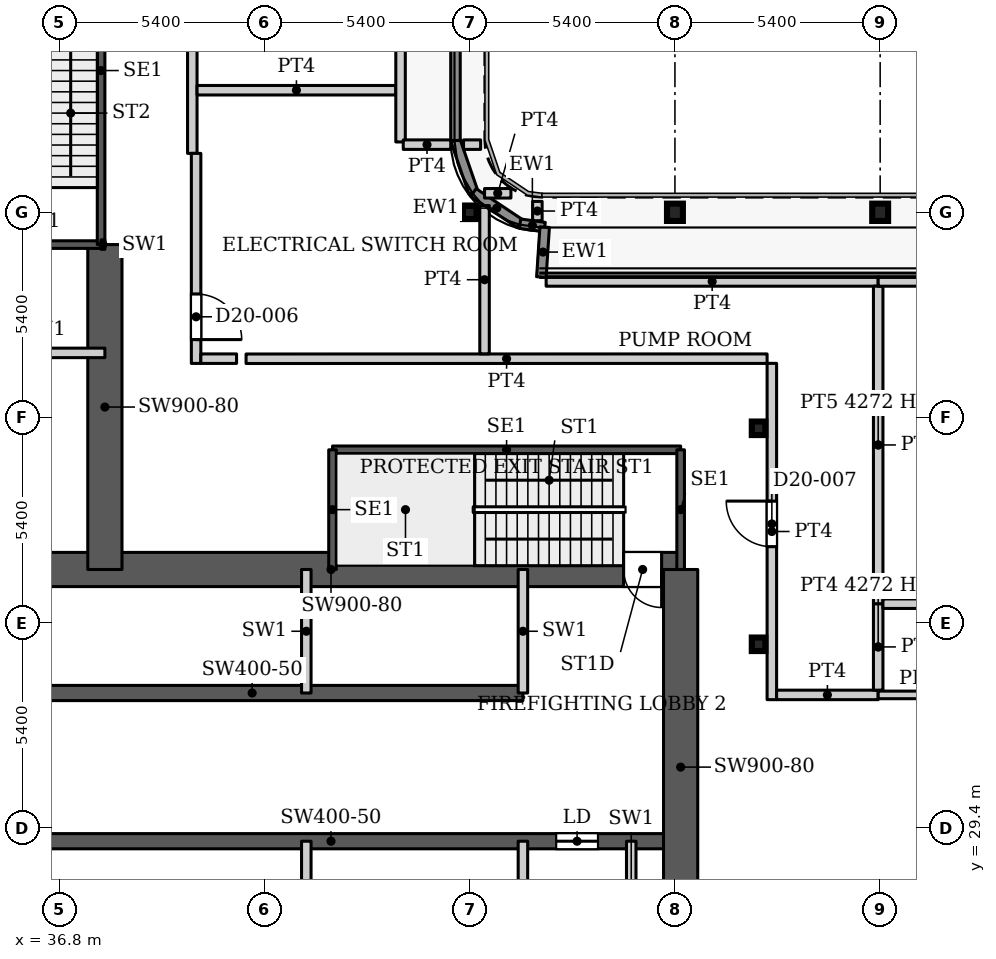
"""IFC4 building model, lengths in metres.
Left out: names, types, materials, properties, quantities, classifications, styles, units other than length and angle.
Written with IfcOpenShell. Run it as: python <this file> out.ifc"""

import sys

from ifc_helpers import new_model, si_unit, direction, frame, frame_2d, origin, origin_2d, place, context, subcontext, project, spatial, rectangle, hollow_rectangle, i_section, extrude, source, transform, mapped, element, fill, save


model = new_model("IFC4")
c1 = context("Model", 3, precision=1e-05, world=origin(), true_north=direction((0.0, 1.0)))
c2 = subcontext(c1, "Body", "Model", "MODEL_VIEW")
j1 = project(units=[si_unit("LENGTHUNIT", "METRE"), si_unit("PLANEANGLEUNIT", "RADIAN")], contexts=[c1])
p1 = place(None, origin())
s1 = spatial("IfcSite", under=j1, at=p1, CompositionType="ELEMENT")
p2 = place(p1, origin())
s2 = spatial("IfcBuilding", under=s1, at=p2, CompositionType="ELEMENT")
p3 = place(p2, frame((0.0, 0.0, 89.0)))
s3 = spatial("IfcBuildingStorey", under=s2, at=p3, CompositionType="ELEMENT", Elevation=89.0)
for number, where, z_axis, x_axis in (
    (1, (53.0, 45.6, 0.0), (0.0, 0.0, 1.0), (1.0, 0.0, 0.0)),
    (2, (58.4, 45.6, 0.0), (0.0, 0.0, 1.0), (1.0, 0.0, 0.0)),
):
    element("IfcColumn", number, at=place(p3, frame(where, z_axis=z_axis, x_axis=x_axis)), inside=s3, PredefinedType="COLUMN", context=c2, shape_type="SweptSolid", body=[
        extrude(i_section(OverallWidth=0.418, OverallDepth=0.455, WebThickness=0.042, FlangeThickness=0.068, FilletRadius=0.014, at=origin_2d()), origin(), (0.0, 0.0, 1.0), 5.1),
    ])
for number, where, z_axis, x_axis in (
    (3, (55.2, 34.232, 0.0), (0.0, 0.0, 1.0), (1.0, 0.0, 0.0)),
    (4, (55.2, 39.916, 0.0), (0.0, 0.0, 1.0), (1.0, 0.0, 0.0)),
    (5, (47.6, 45.6, 0.0), (0.0, 0.0, 1.0), (1.0, 0.0, 0.0)),
):
    element("IfcColumn", number, at=place(p3, frame(where, z_axis=z_axis, x_axis=x_axis)), inside=s3, PredefinedType="COLUMN", context=c2, shape_type="SweptSolid", body=[
        extrude(hollow_rectangle(XDim=0.356, YDim=0.356, WallThickness=0.016, InnerFilletRadius=0.016, OuterFilletRadius=0.032, at=origin_2d()), origin(), (0.0, 0.0, 1.0), 5.1),
    ])
p4 = place(p3, frame((34.75, 29.05, 0.0), z_axis=(0.0, 0.0, 1.0), x_axis=(1.0, 0.0, 0.0)))
e6 = element("IfcWall", 6, at=p4, inside=s3, PredefinedType="SHEAR", context=c2, shape_type="SweptSolid", body=[
    extrude(rectangle(XDim=18.4, YDim=0.4, at=frame_2d((9.2, 0.0))), origin(), (0.0, 0.0, 1.0), 5.1),
])
p5 = place(p4, frame((15.125, 0.0, 0.0)))
e7 = element("IfcOpeningElement", 7, at=p5, cuts=e6, PredefinedType="OPENING", context=c2, shape_type="SweptSolid", body=[
    extrude(rectangle(XDim=1.1, YDim=2.2, at=frame_2d((0.55, 1.1))), frame((0.0, 0.21, 0.0), z_axis=(0.0, -1.0, 0.0), x_axis=(1.0, 0.0, 0.0)), (0.0, 0.0, 1.0), 0.42),
])
p6 = place(p3, frame((34.75, 32.95, 0.0), z_axis=(0.0, 0.0, 1.0), x_axis=(1.0, 0.0, 0.0)))
e8 = element("IfcWall", 8, at=p6, inside=s3, PredefinedType="SHEAR", context=c2, shape_type="SweptSolid", body=[
    extrude(rectangle(XDim=14.25, YDim=0.4, at=frame_2d((7.125, 0.0))), origin(), (0.0, 0.0, 1.0), 5.1),
])
p7 = place(p3, frame((34.75, 36.2, 0.0), z_axis=(0.0, 0.0, 1.0), x_axis=(1.0, 0.0, 0.0)))
e9 = element("IfcWall", 9, at=p7, inside=s3, PredefinedType="SHEAR", context=c2, shape_type="SweptSolid", body=[
    extrude(rectangle(XDim=18.4, YDim=0.9, at=frame_2d((9.2, 0.0))), origin(), (0.0, 0.0, 1.0), 5.1),
])
p8 = place(p7, frame((16.9, 0.0, 0.0)))
e10 = element("IfcOpeningElement", 10, at=p8, cuts=e9, PredefinedType="OPENING", context=c2, shape_type="SweptSolid", body=[
    extrude(rectangle(XDim=1.0, YDim=2.2, at=frame_2d((0.5, 1.1))), frame((0.0, 0.46, 0.0), z_axis=(0.0, -1.0, 0.0), x_axis=(1.0, 0.0, 0.0)), (0.0, 0.0, 1.0), 0.92),
])
p9 = place(p3, frame((38.0, 36.2, 0.0), z_axis=(0.0, 0.0, 1.0), x_axis=(0.0, 1.0, 0.0)))
e11 = element("IfcWall", 11, at=p9, inside=s3, PredefinedType="SHEAR", context=c2, shape_type="SweptSolid", body=[
    extrude(rectangle(XDim=8.55, YDim=0.9, at=frame_2d((4.275, 0.0))), origin(), (0.0, 0.0, 1.0), 5.1),
])
p10 = place(p3, frame((53.15, 25.8, 0.0), z_axis=(0.0, 0.0, 1.0), x_axis=(0.0, 1.0, 0.0)))
e12 = element("IfcWall", 12, at=p10, inside=s3, PredefinedType="SHEAR", context=c2, shape_type="SweptSolid", body=[
    extrude(rectangle(XDim=10.4, YDim=0.9, at=frame_2d((5.2, 0.0))), origin(), (0.0, 0.0, 1.0), 5.1),
])
p11 = place(p3, frame((47.225, 47.49, 0.0), z_axis=(0.0, 0.0, 1.0), x_axis=(0.326317748334, -0.945260137276, 0.0)))
e13 = element("IfcWall", 13, at=p11, inside=s3, PredefinedType="SOLIDWALL", context=c2, shape_type="SweptSolid", body=[
    extrude(rectangle(XDim=1.449, YDim=0.25, at=frame_2d((0.725, 0.0))), origin(), (0.0, 0.0, 1.0), 4.95),
])
p12 = place(p3, frame((47.698, 46.12, 0.0), z_axis=(0.0, 0.0, 1.0), x_axis=(0.831413506611, -0.555654191943, 0.0)))
e14 = element("IfcWall", 14, at=p12, inside=s3, PredefinedType="SOLIDWALL", context=c2, shape_type="SweptSolid", body=[
    extrude(rectangle(XDim=1.476, YDim=0.25, at=frame_2d((0.738, 0.0))), origin(), (0.0, 0.0, 1.0), 4.95),
])
p13 = place(p3, frame((48.925, 45.3, 0.0), z_axis=(0.0, 0.0, 1.0), x_axis=(0.990444114284, -0.137914671008, 0.0)))
e15 = element("IfcWall", 15, at=p13, inside=s3, PredefinedType="SOLIDWALL", context=c2, shape_type="SweptSolid", body=[
    extrude(rectangle(XDim=0.653, YDim=0.25, at=frame_2d((0.327, 0.0))), origin(), (0.0, 0.0, 1.0), 4.95),
])
p14 = place(p3, frame((49.572, 45.21, 0.0), z_axis=(0.0, 0.0, 1.0), x_axis=(-0.065312093682, -0.997864885853, 0.0)))
e16 = element("IfcWall", 16, at=p14, inside=s3, PredefinedType="SOLIDWALL", context=c2, shape_type="SweptSolid", body=[
    extrude(rectangle(XDim=1.316, YDim=0.25, at=frame_2d((0.658, 0.0))), origin(), (0.0, 0.0, 1.0), 4.95),
])
p15 = place(p3, frame((47.225, 98.66, 0.0), z_axis=(0.0, 0.0, 1.0), x_axis=(0.0, -1.0, 0.0)))
e17 = element("IfcWall", 17, at=p15, inside=s3, PredefinedType="SOLIDWALL", context=c2, shape_type="SweptSolid", body=[
    extrude(rectangle(XDim=51.17, YDim=0.25, at=frame_2d((25.585, 0.0))), origin(), (0.0, 0.0, 1.0), 4.95),
])
p16 = place(p3, frame((43.99, 39.35, 0.0), z_axis=(0.0, 0.0, 1.0), x_axis=(1.0, 0.0, 0.0)))
e18 = element("IfcWall", 18, at=p16, inside=s3, PredefinedType="SHEAR", context=c2, shape_type="SweptSolid", body=[
    extrude(rectangle(XDim=9.16, YDim=0.2, at=frame_2d((4.58, 0.0))), origin(), (0.0, 0.0, 1.0), 5.1),
])
for number, where, z_axis, x_axis in (
    (19, (43.99, 36.2, 0.0), (0.0, 0.0, 1.0), (0.0, 1.0, 0.0)),
    (20, (53.15, 36.2, 0.0), (0.0, 0.0, 1.0), (0.0, 1.0, 0.0)),
):
    element("IfcWall", number, at=place(p3, frame(where, z_axis=z_axis, x_axis=x_axis)), inside=s3, PredefinedType="SHEAR", context=c2, shape_type="SweptSolid", body=[
        extrude(rectangle(XDim=3.15, YDim=0.2, at=frame_2d((1.575, 0.0))), origin(), (0.0, 0.0, 1.0), 5.1),
    ])
p17 = place(p3, frame((34.75, 44.75, 0.0), z_axis=(0.0, 0.0, 1.0), x_axis=(1.0, 0.0, 0.0)))
e21 = element("IfcWall", 21, at=p17, inside=s3, PredefinedType="SHEAR", context=c2, shape_type="SweptSolid", body=[
    extrude(rectangle(XDim=3.15, YDim=0.2, at=frame_2d((1.575, 0.0))), origin(), (0.0, 0.0, 1.0), 5.1),
])
p18 = place(p3, frame((37.9, 44.75, 0.0), z_axis=(0.0, 0.0, 1.0), x_axis=(0.0, 1.0, 0.0)))
e22 = element("IfcWall", 22, at=p18, inside=s3, PredefinedType="SHEAR", context=c2, shape_type="SweptSolid", body=[
    extrude(rectangle(XDim=9.16, YDim=0.2, at=frame_2d((4.58, 0.0))), origin(), (0.0, 0.0, 1.0), 5.1),
])
for number, where, z_axis, x_axis in (
    (23, (43.3, 25.8, 0.0), (0.0, 0.0, 1.0), (0.0, 1.0, 0.0)),
    (24, (43.3, 32.95, 0.0), (0.0, 0.0, 1.0), (0.0, 1.0, 0.0)),
    (25, (49.0, 25.8, 0.0), (0.0, 0.0, 1.0), (0.0, 1.0, 0.0)),
    (26, (49.0, 32.95, 0.0), (0.0, 0.0, 1.0), (0.0, 1.0, 0.0)),
    (27, (51.85, 25.8, 0.0), (0.0, 0.0, 1.0), (0.0, 1.0, 0.0)),
    (28, (34.75, 41.9, 0.0), (0.0, 0.0, 1.0), (1.0, 0.0, 0.0)),
):
    element("IfcWall", number, at=place(p3, frame(where, z_axis=z_axis, x_axis=x_axis)), inside=s3, PredefinedType="PARTITIONING", context=c2, shape_type="SweptSolid", body=[
        extrude(rectangle(XDim=3.25, YDim=0.25, at=frame_2d((1.625, 0.0))), origin(), (0.0, 0.0, 1.0), 5.1),
    ])
p19 = place(p3, frame((37.9, 44.75, 0.0), z_axis=(0.0, 0.0, 1.0), x_axis=(1.0, 0.0, 0.0)))
e29 = element("IfcWall", 29, at=p19, inside=s3, PredefinedType="PARTITIONING", context=c2, shape_type="SweptSolid", body=[
    extrude(rectangle(XDim=0.1, YDim=0.25, at=frame_2d((0.05, 0.0))), origin(), (0.0, 0.0, 1.0), 5.1),
])
p20 = place(p3, frame((40.3, 47.15, 0.0), z_axis=(0.0, 0.0, 1.0), x_axis=(0.0, 1.0, 0.0)))
e30 = element("IfcWall", 30, at=p20, inside=s3, PredefinedType="PARTITIONING", context=c2, shape_type="SweptSolid", body=[
    extrude(rectangle(XDim=9.285, YDim=0.25, at=frame_2d((4.643, 0.0))), origin(), (0.0, 0.0, 1.0), 4.8),
])
p21 = place(p20, frame((4.812, 0.0, 0.0)))
e31 = element("IfcOpeningElement", 31, at=p21, cuts=e30, PredefinedType="OPENING", context=c2, shape_type="SweptSolid", body=[
    extrude(rectangle(XDim=1.2, YDim=2.1, at=frame_2d((0.6, 1.05))), frame((0.0, 0.135, 0.0), z_axis=(0.0, -1.0, 0.0), x_axis=(1.0, 0.0, 0.0)), (0.0, 0.0, 1.0), 0.27),
])
p22 = place(p3, frame((40.4, 41.623, 0.0), z_axis=(0.0, 0.0, 1.0), x_axis=(0.0, 1.0, 0.0)))
e32 = element("IfcWall", 32, at=p22, inside=s3, PredefinedType="PARTITIONING", context=c2, shape_type="SweptSolid", body=[
    extrude(rectangle(XDim=5.527, YDim=0.25, at=frame_2d((2.763, 0.0))), origin(), (0.0, 0.0, 1.0), 4.8),
])
p23 = place(p22, frame((0.627, 0.0, 0.0)))
e33 = element("IfcOpeningElement", 33, at=p23, cuts=e32, PredefinedType="OPENING", context=c2, shape_type="SweptSolid", body=[
    extrude(rectangle(XDim=1.2, YDim=2.1, at=frame_2d((0.6, 1.05))), frame((0.0, 0.135, 0.0), z_axis=(0.0, -1.0, 0.0), x_axis=(1.0, 0.0, 0.0)), (0.0, 0.0, 1.0), 0.27),
])
p24 = place(p3, frame((40.425, 48.812, 0.0), z_axis=(0.0, 0.0, 1.0), x_axis=(1.0, 0.0, 0.0)))
e34 = element("IfcWall", 34, at=p24, inside=s3, PredefinedType="PARTITIONING", context=c2, shape_type="SweptSolid", body=[
    extrude(rectangle(XDim=5.23, YDim=0.25, at=frame_2d((2.615, 0.0))), origin(), (0.0, 0.0, 1.0), 4.8),
])
p25 = place(p3, frame((40.525, 41.748, 0.0), z_axis=(0.0, 0.0, 1.0), x_axis=(1.0, 0.0, 0.0)))
e35 = element("IfcWall", 35, at=p25, inside=s3, PredefinedType="PARTITIONING", context=c2, shape_type="SweptSolid", body=[
    extrude(rectangle(XDim=0.94, YDim=0.25, at=frame_2d((0.47, 0.0))), origin(), (0.0, 0.0, 1.0), 4.8),
])
p26 = place(p3, frame((41.715, 41.746, 0.0), z_axis=(0.0, 0.0, 1.0), x_axis=(0.999999989853, 0.000142460288, 0.0)))
e36 = element("IfcWall", 36, at=p26, inside=s3, PredefinedType="PARTITIONING", context=c2, shape_type="SweptSolid", body=[
    extrude(rectangle(XDim=13.71, YDim=0.25, at=frame_2d((6.855, 0.0))), origin(), (0.0, 0.0, 1.0), 4.8),
])
p27 = place(p3, frame((45.78, 47.451, 0.0), z_axis=(0.0, 0.0, 1.0), x_axis=(0.0, 1.0, 0.0)))
e37 = element("IfcWall", 37, at=p27, inside=s3, PredefinedType="PARTITIONING", context=c2, shape_type="SweptSolid", body=[
    extrude(rectangle(XDim=11.573, YDim=0.25, at=frame_2d((5.787, 0.0))), origin(), (0.0, 0.0, 1.0), 4.8),
])
p28 = place(p3, frame((45.851, 47.38, 0.0), z_axis=(0.0, 0.0, 1.0), x_axis=(1.0, 0.0, 0.0)))
e38 = element("IfcWall", 38, at=p28, inside=s3, PredefinedType="PARTITIONING", context=c2, shape_type="SweptSolid", body=[
    extrude(rectangle(XDim=1.25, YDim=0.25, at=frame_2d((0.625, 0.0))), origin(), (0.0, 0.0, 1.0), 4.8),
])
p29 = place(p3, frame((47.437, 47.38, 0.0), z_axis=(0.0, 0.0, 1.0), x_axis=(1.0, 0.0, 0.0)))
e39 = element("IfcWall", 39, at=p29, inside=s3, PredefinedType="PARTITIONING", context=c2, shape_type="SweptSolid", body=[
    extrude(rectangle(XDim=0.45, YDim=0.25, at=frame_2d((0.225, 0.0))), origin(), (0.0, 0.0, 1.0), 4.8),
])
p30 = place(p3, frame((47.99, 41.875, 0.0), z_axis=(0.0, 0.0, 1.0), x_axis=(0.0, 1.0, 0.0)))
e40 = element("IfcWall", 40, at=p30, inside=s3, PredefinedType="PARTITIONING", context=c2, shape_type="SweptSolid", body=[
    extrude(rectangle(XDim=3.901, YDim=0.25, at=frame_2d((1.95, 0.0))), origin(), (0.0, 0.0, 1.0), 4.8),
])
p31 = place(p3, frame((47.99, 46.1, 0.0), z_axis=(0.0, 0.0, 1.0), x_axis=(1.0, 0.0, 0.0)))
e41 = element("IfcWall", 41, at=p31, inside=s3, PredefinedType="PARTITIONING", context=c2, shape_type="SweptSolid", body=[
    extrude(rectangle(XDim=0.694, YDim=0.25, at=frame_2d((0.347, 0.0))), origin(), (0.0, 0.0, 1.0), 4.8),
])
p32 = place(p3, frame((49.38, 45.379, 0.0), z_axis=(0.0, 0.0, 1.0), x_axis=(0.0, 1.0, 0.0)))
e42 = element("IfcWall", 42, at=p32, inside=s3, PredefinedType="PARTITIONING", context=c2, shape_type="SweptSolid", body=[
    extrude(rectangle(XDim=0.508, YDim=0.25, at=frame_2d((0.254, 0.0))), origin(), (0.0, 0.0, 1.0), 4.8),
])
p33 = place(p3, frame((49.611, 43.78, 0.0), z_axis=(0.0, 0.0, 1.0), x_axis=(1.0, 0.0, 0.0)))
e43 = element("IfcWall", 43, at=p33, inside=s3, PredefinedType="PARTITIONING", context=c2, shape_type="SweptSolid", body=[
    extrude(rectangle(XDim=8.737, YDim=0.25, at=frame_2d((4.368, 0.0))), origin(), (0.0, 0.0, 1.0), 4.8),
])
p34 = place(p3, frame((55.55, 32.775, 0.0), z_axis=(0.0, 0.0, 1.0), x_axis=(0.0, 1.0, 0.0)))
e44 = element("IfcWall", 44, at=p34, inside=s3, PredefinedType="PARTITIONING", context=c2, shape_type="SweptSolid", body=[
    extrude(rectangle(XDim=8.85, YDim=0.25, at=frame_2d((4.425, 0.0))), origin(), (0.0, 0.0, 1.0), 4.8),
])
p35 = place(p34, frame((4.025, 0.0, 0.0)))
e45 = element("IfcOpeningElement", 45, at=p35, cuts=e44, PredefinedType="OPENING", context=c2, shape_type="SweptSolid", body=[
    extrude(rectangle(XDim=1.2, YDim=2.1, at=frame_2d((0.6, 1.05))), frame((0.0, 0.135, 0.0), z_axis=(0.0, -1.0, 0.0), x_axis=(1.0, 0.0, 0.0)), (0.0, 0.0, 1.0), 0.27),
])
p36 = place(p3, frame((55.675, 32.9, 0.0), z_axis=(0.0, 0.0, 1.0), x_axis=(1.0, 0.0, 0.0)))
e46 = element("IfcWall", 46, at=p36, inside=s3, PredefinedType="PARTITIONING", context=c2, shape_type="SweptSolid", body=[
    extrude(rectangle(XDim=2.673, YDim=0.25, at=frame_2d((1.336, 0.0))), origin(), (0.0, 0.0, 1.0), 4.8),
])
p37 = place(p3, frame((58.348, 32.9, 0.0), z_axis=(0.0, 0.0, 1.0), x_axis=(1.0, 0.0, 0.0)))
e47 = element("IfcWall", 47, at=p37, inside=s3, PredefinedType="PARTITIONING", context=c2, shape_type="SweptSolid", body=[
    extrude(rectangle(XDim=41.532, YDim=0.2, at=frame_2d((20.766, 0.0))), origin(), (0.0, 0.0, 1.0), 4.8),
])
p38 = place(p37, frame((4.158, 0.0, 0.0)))
e48 = element("IfcOpeningElement", 48, at=p38, cuts=e47, PredefinedType="OPENING", context=c2, shape_type="SweptSolid", body=[
    extrude(rectangle(XDim=1.8, YDim=2.1, at=frame_2d((0.9, 1.05))), frame((0.0, 0.11, 0.0), z_axis=(0.0, -1.0, 0.0), x_axis=(1.0, 0.0, 0.0)), (0.0, 0.0, 1.0), 0.22),
])
p39 = place(p37, frame((14.516, 0.0, 0.0)))
e49 = element("IfcOpeningElement", 49, at=p39, cuts=e47, PredefinedType="OPENING", context=c2, shape_type="SweptSolid", body=[
    extrude(rectangle(XDim=1.8, YDim=2.1, at=frame_2d((0.9, 1.05))), frame((0.0, 0.11, 0.0), z_axis=(0.0, -1.0, 0.0), x_axis=(1.0, 0.0, 0.0)), (0.0, 0.0, 1.0), 0.22),
])
p40 = place(p37, frame((24.874, 0.0, 0.0)))
e50 = element("IfcOpeningElement", 50, at=p40, cuts=e47, PredefinedType="OPENING", context=c2, shape_type="SweptSolid", body=[
    extrude(rectangle(XDim=1.8, YDim=2.1, at=frame_2d((0.9, 1.05))), frame((0.0, 0.11, 0.0), z_axis=(0.0, -1.0, 0.0), x_axis=(1.0, 0.0, 0.0)), (0.0, 0.0, 1.0), 0.22),
])
p41 = place(p37, frame((35.232, 0.0, 0.0)))
e51 = element("IfcOpeningElement", 51, at=p41, cuts=e47, PredefinedType="OPENING", context=c2, shape_type="SweptSolid", body=[
    extrude(rectangle(XDim=1.8, YDim=2.1, at=frame_2d((0.9, 1.05))), frame((0.0, 0.11, 0.0), z_axis=(0.0, -1.0, 0.0), x_axis=(1.0, 0.0, 0.0)), (0.0, 0.0, 1.0), 0.22),
])
p42 = place(p3, frame((58.348, 33.025, 0.0), z_axis=(0.0, 0.0, 1.0), x_axis=(0.0, 1.0, 0.0)))
e52 = element("IfcWall", 52, at=p42, inside=s3, PredefinedType="PARTITIONING", context=c2, shape_type="SweptSolid", body=[
    extrude(rectangle(XDim=2.275, YDim=0.25, at=frame_2d((1.138, 0.0))), origin(), (0.0, 0.0, 1.0), 4.272),
])
p43 = place(p3, frame((58.348, 35.3, 0.0), z_axis=(0.0, 0.0, 1.0), x_axis=(0.0, 1.0, 0.0)))
e53 = element("IfcWall", 53, at=p43, inside=s3, PredefinedType="PARTITIONING", context=c2, shape_type="SweptSolid", body=[
    extrude(rectangle(XDim=8.355, YDim=0.25, at=frame_2d((4.177, 0.0))), origin(), (0.0, 0.0, 1.0), 4.272),
])
p44 = place(p3, frame((58.348, 43.78, 0.0), z_axis=(0.0, 0.0, 1.0), x_axis=(1.0, 0.0, 0.0)))
e54 = element("IfcWall", 54, at=p44, inside=s3, PredefinedType="PARTITIONING", context=c2, shape_type="SweptSolid", body=[
    extrude(rectangle(XDim=14.783, YDim=0.25, at=frame_2d((7.392, 0.0))), origin(), (0.0, 0.0, 1.0), 4.8),
])
p45 = place(p3, frame((58.473, 35.3, 0.0), z_axis=(0.0, 0.0, 1.0), x_axis=(1.0, 0.0, 0.0)))
e55 = element("IfcWall", 55, at=p45, inside=s3, PredefinedType="PARTITIONING", context=c2, shape_type="SweptSolid", body=[
    extrude(rectangle(XDim=41.182, YDim=0.25, at=frame_2d((20.591, 0.0))), origin(), (0.0, 0.0, 1.0), 4.8),
])
p46 = place(p45, frame((4.033, 0.0, 0.0)))
e56 = element("IfcOpeningElement", 56, at=p46, cuts=e55, PredefinedType="OPENING", context=c2, shape_type="SweptSolid", body=[
    extrude(rectangle(XDim=1.8, YDim=2.1, at=frame_2d((0.9, 1.05))), frame((0.0, 0.135, 0.0), z_axis=(0.0, -1.0, 0.0), x_axis=(1.0, 0.0, 0.0)), (0.0, 0.0, 1.0), 0.27),
])
p47 = place(p45, frame((14.391, 0.0, 0.0)))
e57 = element("IfcOpeningElement", 57, at=p47, cuts=e55, PredefinedType="OPENING", context=c2, shape_type="SweptSolid", body=[
    extrude(rectangle(XDim=1.8, YDim=2.1, at=frame_2d((0.9, 1.05))), frame((0.0, 0.135, 0.0), z_axis=(0.0, -1.0, 0.0), x_axis=(1.0, 0.0, 0.0)), (0.0, 0.0, 1.0), 0.27),
])
p48 = place(p45, frame((24.499, 0.0, 0.0)))
e58 = element("IfcOpeningElement", 58, at=p48, cuts=e55, PredefinedType="OPENING", context=c2, shape_type="SweptSolid", body=[
    extrude(rectangle(XDim=1.8, YDim=2.1, at=frame_2d((0.9, 1.05))), frame((0.0, 0.135, 0.0), z_axis=(0.0, -1.0, 0.0), x_axis=(1.0, 0.0, 0.0)), (0.0, 0.0, 1.0), 0.27),
])
p49 = place(p45, frame((35.107, 0.0, 0.0)))
e59 = element("IfcOpeningElement", 59, at=p49, cuts=e55, PredefinedType="OPENING", context=c2, shape_type="SweptSolid", body=[
    extrude(rectangle(XDim=1.8, YDim=2.1, at=frame_2d((0.9, 1.05))), frame((0.0, 0.135, 0.0), z_axis=(0.0, -1.0, 0.0), x_axis=(1.0, 0.0, 0.0)), (0.0, 0.0, 1.0), 0.27),
])
m1 = source(origin(), c2, "Body", "SweptSolid", [
    extrude(rectangle(XDim=1.1, YDim=2.2, at=frame_2d((0.55, 1.1))), frame((0.0, 0.025, 0.0), z_axis=(0.0, -1.0, 0.0), x_axis=(1.0, 0.0, 0.0)), (0.0, 0.0, 1.0), 0.05),
])
p50 = place(p5, origin())
e60 = element("IfcDoor", 60, at=p50, inside=s3, OperationType="SLIDING_TO_LEFT", PredefinedType="DOOR", context=c2, shape_type="MappedRepresentation", body=[
    mapped(m1, transform((0.0, 0.0, 0.0), x_axis=(1.0, 0.0, 0.0), y_axis=(0.0, 1.0, 0.0), z_axis=(0.0, 0.0, 1.0), scale=1.0)),
])
fill(e7, e60)
m2 = source(origin(), c2, "Body", "SweptSolid", [
    extrude(rectangle(XDim=1.0, YDim=2.2, at=frame_2d((0.5, 1.1))), frame((0.0, 0.025, 0.0), z_axis=(0.0, -1.0, 0.0), x_axis=(1.0, 0.0, 0.0)), (0.0, 0.0, 1.0), 0.05),
])
p51 = place(p8, origin())
e61 = element("IfcDoor", 61, at=p51, inside=s3, OperationType="SINGLE_SWING_RIGHT", PredefinedType="DOOR", context=c2, shape_type="MappedRepresentation", body=[
    mapped(m2, transform((0.0, 0.0, 0.0), x_axis=(1.0, 0.0, 0.0), y_axis=(0.0, 1.0, 0.0), z_axis=(0.0, 0.0, 1.0), scale=1.0)),
])
fill(e10, e61)
m3 = source(origin(), c2, "Body", "SweptSolid", [
    extrude(rectangle(XDim=1.2, YDim=2.1, at=frame_2d((0.6, 1.05))), frame((0.0, 0.025, 0.0), z_axis=(0.0, -1.0, 0.0), x_axis=(1.0, 0.0, 0.0)), (0.0, 0.0, 1.0), 0.05),
])
p52 = place(p23, origin())
e62 = element("IfcDoor", 62, at=p52, inside=s3, OperationType="SINGLE_SWING_RIGHT", PredefinedType="DOOR", context=c2, shape_type="MappedRepresentation", body=[
    mapped(m3, transform((0.0, 0.0, 0.0), x_axis=(1.0, 0.0, 0.0), y_axis=(0.0, 1.0, 0.0), z_axis=(0.0, 0.0, 1.0), scale=1.0)),
])
fill(e33, e62)
p53 = place(p35, origin())
e63 = element("IfcDoor", 63, at=p53, inside=s3, OperationType="SINGLE_SWING_LEFT", PredefinedType="DOOR", context=c2, shape_type="MappedRepresentation", body=[
    mapped(m3, transform((0.0, 0.0, 0.0), x_axis=(1.0, 0.0, 0.0), y_axis=(0.0, 1.0, 0.0), z_axis=(0.0, 0.0, 1.0), scale=1.0)),
])
fill(e45, e63)
save(model, sys.argv[1])
